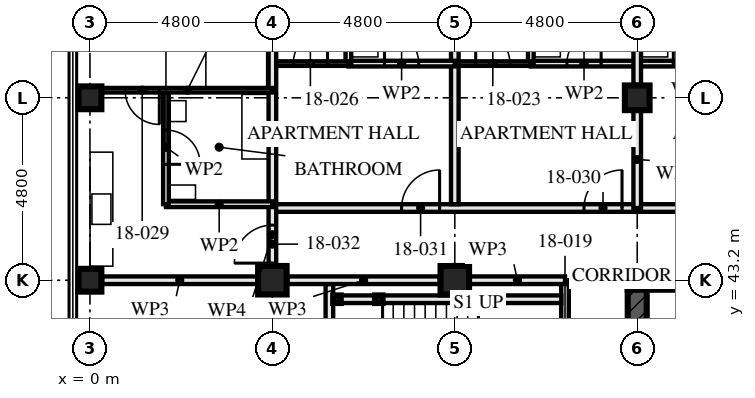
"""IFC4 building model, lengths in metres.
Left out: names, types, materials, properties, quantities, classifications, styles, units other than length and angle.
Written with IfcOpenShell. Run it as: python <this file> out.ifc"""

import sys

from ifc_helpers import new_model, si_unit, direction, frame, frame_2d, origin, origin_2d, place, context, subcontext, project, spatial, rectangle, hollow_rectangle, extrude, element, fill, save


model = new_model("IFC4")
c1 = context("Model", 3, precision=1e-05, world=origin(), true_north=direction((0.0, 1.0)))
c2 = subcontext(c1, "Body", "Model", "MODEL_VIEW")
j1 = project(units=[si_unit("LENGTHUNIT", "METRE"), si_unit("PLANEANGLEUNIT", "RADIAN")], contexts=[c1])
p1 = place(None, origin())
s1 = spatial("IfcSite", under=j1, at=p1, CompositionType="ELEMENT")
p2 = place(p1, origin())
s2 = spatial("IfcBuilding", under=s1, at=p2, CompositionType="ELEMENT")
p3 = place(p2, frame((0.0, 0.0, 69.0)))
s3 = spatial("IfcBuildingStorey", under=s2, at=p3, CompositionType="ELEMENT", Elevation=69.0)
for number, where, z_axis, x_axis in (
    (1, (0.0, 43.2, 0.0), (0.0, 0.0, 1.0), (0.0, 1.0, 0.0)),
    (2, (0.0, 48.0, 0.0), (0.0, 0.0, 1.0), (1.0, 0.0, 0.0)),
):
    element("IfcColumn", number, at=place(p3, frame(where, z_axis=z_axis, x_axis=x_axis)), inside=s3, PredefinedType="COLUMN", context=c2, shape_type="SweptSolid", body=[
        extrude(hollow_rectangle(XDim=0.6, YDim=0.6, WallThickness=0.08, at=origin_2d()), origin(), (0.0, 0.0, 1.0), 3.5),
    ])
for number, where, z_axis, x_axis in (
    (3, (4.8, 43.2, 0.0), (0.0, 0.0, 1.0), (0.0, 1.0, 0.0)),
    (4, (9.6, 43.2, 0.0), (0.0, 0.0, 1.0), (0.0, 1.0, 0.0)),
):
    element("IfcColumn", number, at=place(p3, frame(where, z_axis=z_axis, x_axis=x_axis)), inside=s3, PredefinedType="COLUMN", context=c2, shape_type="SweptSolid", body=[
        extrude(hollow_rectangle(XDim=0.75, YDim=0.75, WallThickness=0.08, at=origin_2d()), origin(), (0.0, 0.0, 1.0), 3.5),
    ])
p4 = place(p3, frame((14.4, 48.0, 0.0), z_axis=(0.0, 0.0, 1.0), x_axis=(1.0, 0.0, 0.0)))
e5 = element("IfcColumn", 5, at=p4, inside=s3, PredefinedType="COLUMN", context=c2, shape_type="SweptSolid", body=[
    extrude(hollow_rectangle(XDim=0.65, YDim=0.65, WallThickness=0.05, at=origin_2d()), origin(), (0.0, 0.0, 1.0), 3.5),
])
p5 = place(p3, frame((29.05, 43.2, -0.17), z_axis=(0.0, 0.0, 1.0), x_axis=(-1.0, 0.0, 0.0)))
e6 = element("IfcWall", 6, at=p5, inside=s3, PredefinedType="SHEAR", context=c2, shape_type="SweptSolid", body=[
    extrude(rectangle(XDim=14.9, YDim=0.5, at=frame_2d((7.45, 0.0))), origin(), (0.0, 0.0, 1.0), 3.5),
])
p6 = place(p5, frame((6.85, 0.0, 0.17)))
e7 = element("IfcOpeningElement", 7, at=p6, cuts=e6, PredefinedType="OPENING", context=c2, shape_type="SweptSolid", body=[
    extrude(rectangle(XDim=1.2, YDim=2.1, at=frame_2d((0.6, 1.05))), frame((0.0, 0.26, 0.0), z_axis=(0.0, -1.0, 0.0), x_axis=(1.0, 0.0, 0.0)), (0.0, 0.0, 1.0), 0.521),
])
p7 = place(p3, frame((14.4, 42.95, -0.17), z_axis=(0.0, 0.0, 1.0), x_axis=(0.0, -1.0, 0.0)))
e8 = element("IfcWall", 8, at=p7, inside=s3, PredefinedType="SHEAR", context=c2, shape_type="SweptSolid", body=[
    extrude(rectangle(XDim=13.9, YDim=0.5, at=frame_2d((6.95, 0.0))), origin(), (0.0, 0.0, 1.0), 3.5),
])
p8 = place(p7, frame((6.35, 0.0, 0.17)))
e9 = element("IfcOpeningElement", 9, at=p8, cuts=e8, PredefinedType="OPENING", context=c2, shape_type="SweptSolid", body=[
    extrude(rectangle(XDim=1.2, YDim=2.1, at=frame_2d((0.6, 1.05))), frame((0.0, 0.26, 0.0), z_axis=(0.0, -1.0, 0.0), x_axis=(1.0, 0.0, 0.0)), (0.0, 0.0, 1.0), 0.521),
])
for number, where, z_axis, x_axis in (
    (10, (6.5, 42.7, 0.0), (0.0, 0.0, 1.0), (1.0, 0.0, 0.0)),
    (11, (7.6, 42.7, 0.0), (0.0, 0.0, 1.0), (1.0, 0.0, 0.0)),
):
    element("IfcColumn", number, at=place(p3, frame(where, z_axis=z_axis, x_axis=x_axis)), inside=s3, PredefinedType="COLUMN", context=c2, shape_type="SweptSolid", body=[
        extrude(hollow_rectangle(XDim=0.2, YDim=0.2, WallThickness=0.008, at=origin_2d()), origin(), (0.0, 0.0, 1.0), 3.33),
    ])
p9 = place(p3, frame((6.6, 42.7, 0.0), z_axis=(0.0, 0.0, 1.0), x_axis=(1.0, 0.0, 0.0)))
e12 = element("IfcWall", 12, at=p9, inside=s3, PredefinedType="SOLIDWALL", context=c2, shape_type="SweptSolid", body=[
    extrude(rectangle(XDim=0.9, YDim=0.2, at=frame_2d((0.45, 0.0))), origin(), (0.0, 0.0, 1.0), 2.99),
])
p10 = place(p3, frame((7.7, 42.7, 0.0), z_axis=(0.0, 0.0, 1.0), x_axis=(1.0, 0.0, 0.0)))
e13 = element("IfcWall", 13, at=p10, inside=s3, PredefinedType="SOLIDWALL", context=c2, shape_type="SweptSolid", body=[
    extrude(rectangle(XDim=4.7, YDim=0.2, at=frame_2d((2.35, 0.0))), origin(), (0.0, 0.0, 1.0), 2.99),
])
p11 = place(p3, frame((6.3, 43.1, 0.0), z_axis=(0.0, 0.0, 1.0), x_axis=(0.0, -1.0, 0.0)))
e14 = element("IfcWall", 14, at=p11, inside=s3, PredefinedType="SOLIDWALL", context=c2, shape_type="SweptSolid", body=[
    extrude(rectangle(XDim=3.3, YDim=0.2, at=frame_2d((1.65, 0.0))), origin(), (0.0, 0.0, 1.0), 3.33),
])
p12 = place(p3, frame((12.5, 43.2, 0.0), z_axis=(0.0, 0.0, 1.0), x_axis=(0.0, -1.0, 0.0)))
e15 = element("IfcWall", 15, at=p12, inside=s3, PredefinedType="PARTITIONING", context=c2, shape_type="SweptSolid", body=[
    extrude(rectangle(XDim=14.4, YDim=0.2, at=frame_2d((7.2, 0.0))), origin(), (0.0, 0.0, 1.0), 2.55),
])
p13 = place(p12, frame((1.4, 0.0, 0.0)))
e16 = element("IfcOpeningElement", 16, at=p13, cuts=e15, PredefinedType="OPENING", context=c2, shape_type="SweptSolid", body=[
    extrude(rectangle(XDim=1.0, YDim=2.1, at=frame_2d((0.5, 1.05))), frame((0.0, 0.111, 0.0), z_axis=(0.0, -1.0, 0.0), x_axis=(1.0, 0.0, 0.0)), (0.0, 0.0, 1.0), 0.221),
])
p14 = place(p12, frame((5.2, 0.0, 0.0)))
e17 = element("IfcOpeningElement", 17, at=p14, cuts=e15, PredefinedType="OPENING", context=c2, shape_type="SweptSolid", body=[
    extrude(rectangle(XDim=1.0, YDim=2.1, at=frame_2d((0.5, 1.05))), frame((0.0, 0.111, 0.0), z_axis=(0.0, -1.0, 0.0), x_axis=(1.0, 0.0, 0.0)), (0.0, 0.0, 1.0), 0.221),
])
p15 = place(p12, frame((10.0, 0.0, 0.0)))
e18 = element("IfcOpeningElement", 18, at=p15, cuts=e15, PredefinedType="OPENING", context=c2, shape_type="SweptSolid", body=[
    extrude(rectangle(XDim=1.0, YDim=2.1, at=frame_2d((0.5, 1.05))), frame((0.0, 0.111, 0.0), z_axis=(0.0, -1.0, 0.0), x_axis=(1.0, 0.0, 0.0)), (0.0, 0.0, 1.0), 0.221),
])
p16 = place(p3, frame((11.6, 51.9, 0.0), z_axis=(0.0, 0.0, 1.0), x_axis=(0.0, -1.0, 0.0)))
e19 = element("IfcWall", 19, at=p16, inside=s3, PredefinedType="PARTITIONING", context=c2, shape_type="SweptSolid", body=[
    extrude(rectangle(XDim=3.0, YDim=0.15, at=frame_2d((1.5, 0.0))), origin(), (0.0, 0.0, 1.0), 3.33),
])
p17 = place(p3, frame((14.4, 48.9, 0.0), z_axis=(0.0, 0.0, 1.0), x_axis=(-1.0, 0.0, 0.0)))
e20 = element("IfcWall", 20, at=p17, inside=s3, PredefinedType="PARTITIONING", context=c2, shape_type="SweptSolid", body=[
    extrude(rectangle(XDim=2.8, YDim=0.15, at=frame_2d((1.4, 0.0))), origin(), (0.0, 0.0, 1.0), 3.33),
])
p18 = place(p17, frame((0.95, 0.0, 0.0)))
e21 = element("IfcOpeningElement", 21, at=p18, cuts=e20, PredefinedType="OPENING", context=c2, shape_type="SweptSolid", body=[
    extrude(rectangle(XDim=0.9, YDim=2.1, at=frame_2d((0.45, 1.05))), frame((0.0, 0.085, 0.0), z_axis=(0.0, -1.0, 0.0), x_axis=(1.0, 0.0, 0.0)), (0.0, 0.0, 1.0), 0.171),
])
p19 = place(p3, frame((11.6, 48.9, 0.0), z_axis=(0.0, 0.0, 1.0), x_axis=(-1.0, 0.0, 0.0)))
e22 = element("IfcWall", 22, at=p19, inside=s3, PredefinedType="PARTITIONING", context=c2, shape_type="SweptSolid", body=[
    extrude(rectangle(XDim=2.0, YDim=0.12, at=frame_2d((1.0, 0.0))), origin(), (0.0, 0.0, 1.0), 3.33),
])
p20 = place(p19, frame((0.55, 0.0, 0.0)))
e23 = element("IfcOpeningElement", 23, at=p20, cuts=e22, PredefinedType="OPENING", context=c2, shape_type="SweptSolid", body=[
    extrude(rectangle(XDim=0.9, YDim=2.1, at=frame_2d((0.45, 1.05))), frame((0.0, 0.071, 0.0), z_axis=(0.0, -1.0, 0.0), x_axis=(1.0, 0.0, 0.0)), (0.0, 0.0, 1.0), 0.141),
])
p21 = place(p3, frame((9.6, 57.28, 0.0), z_axis=(0.0, 0.0, 1.0), x_axis=(0.0, -1.0, 0.0)))
e24 = element("IfcWall", 24, at=p21, inside=s3, PredefinedType="PARTITIONING", context=c2, shape_type="SweptSolid", body=[
    extrude(rectangle(XDim=12.08, YDim=0.2, at=frame_2d((6.04, 0.0))), origin(), (0.0, 0.0, 1.0), 2.55),
])
p22 = place(p3, frame((6.8, 51.9, 0.0), z_axis=(0.0, 0.0, 1.0), x_axis=(0.0, -1.0, 0.0)))
e25 = element("IfcWall", 25, at=p22, inside=s3, PredefinedType="PARTITIONING", context=c2, shape_type="SweptSolid", body=[
    extrude(rectangle(XDim=3.0, YDim=0.15, at=frame_2d((1.5, 0.0))), origin(), (0.0, 0.0, 1.0), 3.33),
])
p23 = place(p3, frame((9.6, 48.9, 0.0), z_axis=(0.0, 0.0, 1.0), x_axis=(-1.0, 0.0, 0.0)))
e26 = element("IfcWall", 26, at=p23, inside=s3, PredefinedType="PARTITIONING", context=c2, shape_type="SweptSolid", body=[
    extrude(rectangle(XDim=2.8, YDim=0.15, at=frame_2d((1.4, 0.0))), origin(), (0.0, 0.0, 1.0), 3.33),
])
p24 = place(p23, frame((0.95, 0.0, 0.0)))
e27 = element("IfcOpeningElement", 27, at=p24, cuts=e26, PredefinedType="OPENING", context=c2, shape_type="SweptSolid", body=[
    extrude(rectangle(XDim=0.9, YDim=2.1, at=frame_2d((0.45, 1.05))), frame((0.0, 0.085, 0.0), z_axis=(0.0, -1.0, 0.0), x_axis=(1.0, 0.0, 0.0)), (0.0, 0.0, 1.0), 0.171),
])
p25 = place(p3, frame((6.8, 48.9, 0.0), z_axis=(0.0, 0.0, 1.0), x_axis=(-1.0, 0.0, 0.0)))
e28 = element("IfcWall", 28, at=p25, inside=s3, PredefinedType="PARTITIONING", context=c2, shape_type="SweptSolid", body=[
    extrude(rectangle(XDim=2.0, YDim=0.12, at=frame_2d((1.0, 0.0))), origin(), (0.0, 0.0, 1.0), 3.33),
])
p26 = place(p25, frame((0.55, 0.0, 0.0)))
e29 = element("IfcOpeningElement", 29, at=p26, cuts=e28, PredefinedType="OPENING", context=c2, shape_type="SweptSolid", body=[
    extrude(rectangle(XDim=0.9, YDim=2.1, at=frame_2d((0.45, 1.05))), frame((0.0, 0.071, 0.0), z_axis=(0.0, -1.0, 0.0), x_axis=(1.0, 0.0, 0.0)), (0.0, 0.0, 1.0), 0.141),
])
p27 = place(p3, frame((4.8, 52.48, 0.0), z_axis=(0.0, 0.0, 1.0), x_axis=(0.0, -1.0, 0.0)))
e30 = element("IfcWall", 30, at=p27, inside=s3, PredefinedType="PARTITIONING", context=c2, shape_type="SweptSolid", body=[
    extrude(rectangle(XDim=7.28, YDim=0.2, at=frame_2d((3.64, 0.0))), origin(), (0.0, 0.0, 1.0), 2.55),
])
p28 = place(p3, frame((2.0, 48.2, 0.0), z_axis=(0.0, 0.0, 1.0), x_axis=(0.0, -1.0, 0.0)))
e31 = element("IfcWall", 31, at=p28, inside=s3, PredefinedType="PARTITIONING", context=c2, shape_type="SweptSolid", body=[
    extrude(rectangle(XDim=3.0, YDim=0.15, at=frame_2d((1.5, 0.0))), origin(), (0.0, 0.0, 1.0), 2.55),
])
p29 = place(p28, frame((1.05, 0.0, 0.0)))
e32 = element("IfcOpeningElement", 32, at=p29, cuts=e31, PredefinedType="OPENING", context=c2, shape_type="SweptSolid", body=[
    extrude(rectangle(XDim=0.9, YDim=2.1, at=frame_2d((0.45, 1.05))), frame((0.0, 0.085, 0.0), z_axis=(0.0, -1.0, 0.0), x_axis=(1.0, 0.0, 0.0)), (0.0, 0.0, 1.0), 0.171),
])
p30 = place(p3, frame((4.8, 45.2, 0.0), z_axis=(0.0, 0.0, 1.0), x_axis=(-1.0, 0.0, 0.0)))
e33 = element("IfcWall", 33, at=p30, inside=s3, PredefinedType="PARTITIONING", context=c2, shape_type="SweptSolid", body=[
    extrude(rectangle(XDim=2.8, YDim=0.15, at=frame_2d((1.4, 0.0))), origin(), (0.0, 0.0, 1.0), 3.33),
])
p31 = place(p3, frame((4.8, 48.2, 0.0), z_axis=(0.0, 0.0, 1.0), x_axis=(-1.0, 0.0, 0.0)))
e34 = element("IfcWall", 34, at=p31, inside=s3, PredefinedType="PARTITIONING", context=c2, shape_type="SweptSolid", body=[
    extrude(rectangle(XDim=4.48, YDim=0.12, at=frame_2d((2.24, 0.0))), origin(), (0.0, 0.0, 1.0), 3.33),
])
p32 = place(p31, frame((2.975, 0.0, 0.0)))
e35 = element("IfcOpeningElement", 35, at=p32, cuts=e34, PredefinedType="OPENING", context=c2, shape_type="SweptSolid", body=[
    extrude(rectangle(XDim=0.9, YDim=2.1, at=frame_2d((0.45, 1.05))), frame((0.0, 0.071, 0.0), z_axis=(0.0, -1.0, 0.0), x_axis=(1.0, 0.0, 0.0)), (0.0, 0.0, 1.0), 0.141),
])
p33 = place(p3, frame((14.4, 45.1, 0.0), z_axis=(0.0, 0.0, 1.0), x_axis=(-1.0, 0.0, 0.0)))
e36 = element("IfcWall", 36, at=p33, inside=s3, PredefinedType="PARTITIONING", context=c2, shape_type="SweptSolid", body=[
    extrude(rectangle(XDim=9.6, YDim=0.2, at=frame_2d((4.8, 0.0))), origin(), (0.0, 0.0, 1.0), 3.33),
])
p34 = place(p33, frame((0.4, 0.0, 0.0)))
e37 = element("IfcOpeningElement", 37, at=p34, cuts=e36, PredefinedType="OPENING", context=c2, shape_type="SweptSolid", body=[
    extrude(rectangle(XDim=1.0, YDim=2.1, at=frame_2d((0.5, 1.05))), frame((0.0, 0.111, 0.0), z_axis=(0.0, -1.0, 0.0), x_axis=(1.0, 0.0, 0.0)), (0.0, 0.0, 1.0), 0.221),
])
p35 = place(p33, frame((5.2, 0.0, 0.0)))
e38 = element("IfcOpeningElement", 38, at=p35, cuts=e36, PredefinedType="OPENING", context=c2, shape_type="SweptSolid", body=[
    extrude(rectangle(XDim=1.0, YDim=2.1, at=frame_2d((0.5, 1.05))), frame((0.0, 0.111, 0.0), z_axis=(0.0, -1.0, 0.0), x_axis=(1.0, 0.0, 0.0)), (0.0, 0.0, 1.0), 0.221),
])
p36 = place(p3, frame((4.8, 45.2, 0.0), z_axis=(0.0, 0.0, 1.0), x_axis=(0.0, -1.0, 0.0)))
e39 = element("IfcWall", 39, at=p36, inside=s3, PredefinedType="PARTITIONING", context=c2, shape_type="SweptSolid", body=[
    extrude(rectangle(XDim=1.605, YDim=0.2, at=frame_2d((0.802, 0.0))), origin(), (0.0, 0.0, 1.0), 3.33),
])
p37 = place(p36, frame((0.55, 0.0, 0.0)))
e40 = element("IfcOpeningElement", 40, at=p37, cuts=e39, PredefinedType="OPENING", context=c2, shape_type="SweptSolid", body=[
    extrude(rectangle(XDim=1.0, YDim=2.1, at=frame_2d((0.5, 1.05))), frame((0.0, 0.111, 0.0), z_axis=(0.0, -1.0, 0.0), x_axis=(1.0, 0.0, 0.0)), (0.0, 0.0, 1.0), 0.221),
])
p38 = place(p3, frame((17.2, 48.9, 0.0), z_axis=(0.0, 0.0, 1.0), x_axis=(-1.0, 0.0, 0.0)))
e41 = element("IfcWall", 41, at=p38, inside=s3, PredefinedType="PARTITIONING", context=c2, shape_type="SweptSolid", body=[
    extrude(rectangle(XDim=2.8, YDim=0.15, at=frame_2d((1.4, 0.0))), origin(), (0.0, 0.0, 1.0), 3.33),
])
p39 = place(p38, frame((0.95, 0.0, 0.0)))
e42 = element("IfcOpeningElement", 42, at=p39, cuts=e41, PredefinedType="OPENING", context=c2, shape_type="SweptSolid", body=[
    extrude(rectangle(XDim=0.9, YDim=2.1, at=frame_2d((0.45, 1.05))), frame((0.0, 0.085, 0.0), z_axis=(0.0, -1.0, 0.0), x_axis=(1.0, 0.0, 0.0)), (0.0, 0.0, 1.0), 0.171),
])
p40 = place(p3, frame((28.8, 45.1, 0.0), z_axis=(0.0, 0.0, 1.0), x_axis=(-1.0, 0.0, 0.0)))
e43 = element("IfcWall", 43, at=p40, inside=s3, PredefinedType="PARTITIONING", context=c2, shape_type="SweptSolid", body=[
    extrude(rectangle(XDim=14.4, YDim=0.2, at=frame_2d((7.2, 0.0))), origin(), (0.0, 0.0, 1.0), 3.33),
])
p41 = place(p40, frame((0.4, 0.0, 0.0)))
e44 = element("IfcOpeningElement", 44, at=p41, cuts=e43, PredefinedType="OPENING", context=c2, shape_type="SweptSolid", body=[
    extrude(rectangle(XDim=1.0, YDim=2.1, at=frame_2d((0.5, 1.05))), frame((0.0, 0.111, 0.0), z_axis=(0.0, -1.0, 0.0), x_axis=(1.0, 0.0, 0.0)), (0.0, 0.0, 1.0), 0.221),
])
p42 = place(p40, frame((5.2, 0.0, 0.0)))
e45 = element("IfcOpeningElement", 45, at=p42, cuts=e43, PredefinedType="OPENING", context=c2, shape_type="SweptSolid", body=[
    extrude(rectangle(XDim=1.0, YDim=2.1, at=frame_2d((0.5, 1.05))), frame((0.0, 0.111, 0.0), z_axis=(0.0, -1.0, 0.0), x_axis=(1.0, 0.0, 0.0)), (0.0, 0.0, 1.0), 0.221),
])
p43 = place(p40, frame((10.0, 0.0, 0.0)))
e46 = element("IfcOpeningElement", 46, at=p43, cuts=e43, PredefinedType="OPENING", context=c2, shape_type="SweptSolid", body=[
    extrude(rectangle(XDim=1.0, YDim=2.1, at=frame_2d((0.5, 1.05))), frame((0.0, 0.111, 0.0), z_axis=(0.0, -1.0, 0.0), x_axis=(1.0, 0.0, 0.0)), (0.0, 0.0, 1.0), 0.221),
])
p44 = place(p3, frame((12.5, 43.2, 0.0), z_axis=(0.0, 0.0, 1.0), x_axis=(-1.0, 0.0, 0.0)))
e47 = element("IfcWall", 47, at=p44, inside=s3, PredefinedType="PARTITIONING", context=c2, shape_type="SweptSolid", body=[
    extrude(rectangle(XDim=2.505, YDim=0.2, at=frame_2d((1.252, 0.0))), origin(), (0.0, 0.0, 1.0), 2.32),
])
p45 = place(p3, frame((9.205, 43.2, 0.0), z_axis=(0.0, 0.0, 1.0), x_axis=(-1.0, 0.0, 0.0)))
e48 = element("IfcWall", 48, at=p45, inside=s3, PredefinedType="PARTITIONING", context=c2, shape_type="SweptSolid", body=[
    extrude(rectangle(XDim=4.01, YDim=0.2, at=frame_2d((2.005, 0.0))), origin(), (0.0, 0.0, 1.0), 2.32),
])
p46 = place(p3, frame((4.405, 43.2, 0.0), z_axis=(0.0, 0.0, 1.0), x_axis=(-1.0, 0.0, 0.0)))
e49 = element("IfcWall", 49, at=p46, inside=s3, PredefinedType="PARTITIONING", context=c2, shape_type="SweptSolid", body=[
    extrude(rectangle(XDim=4.085, YDim=0.2, at=frame_2d((2.042, 0.0))), origin(), (0.0, 0.0, 1.0), 2.32),
])
p47 = place(p3, frame((14.4, 45.1, 0.0), z_axis=(0.0, 0.0, 1.0), x_axis=(0.0, 1.0, 0.0)))
e50 = element("IfcWall", 50, at=p47, inside=s3, PredefinedType="PARTITIONING", context=c2, shape_type="SweptSolid", body=[
    extrude(rectangle(XDim=2.555, YDim=0.2, at=frame_2d((1.277, 0.0))), origin(), (0.0, 0.0, 1.0), 2.32),
])
p48 = place(p3, frame((14.4, 48.345, 0.0), z_axis=(0.0, 0.0, 1.0), x_axis=(0.0, 1.0, 0.0)))
e51 = element("IfcWall", 51, at=p48, inside=s3, PredefinedType="PARTITIONING", context=c2, shape_type="SweptSolid", body=[
    extrude(rectangle(XDim=4.11, YDim=0.2, at=frame_2d((2.055, 0.0))), origin(), (0.0, 0.0, 1.0), 2.32),
])
p49 = place(p18, frame((0.9, 0.0, 0.0), z_axis=(0.0, 0.0, 1.0), x_axis=(-1.0, 0.0, 0.0)))
e52 = element("IfcDoor", 52, at=p49, inside=s3, OperationType="SINGLE_SWING_LEFT", PredefinedType="DOOR", context=c2, shape_type="SweptSolid", body=[
    extrude(rectangle(XDim=0.9, YDim=2.1, at=frame_2d((0.45, 1.05))), frame((0.0, 0.022, 0.0), z_axis=(0.0, -1.0, 0.0), x_axis=(1.0, 0.0, 0.0)), (0.0, 0.0, 1.0), 0.044),
])
fill(e21, e52)
p50 = place(p20, frame((0.9, 0.0, 0.0), z_axis=(0.0, 0.0, 1.0), x_axis=(-1.0, 0.0, 0.0)))
e53 = element("IfcDoor", 53, at=p50, inside=s3, OperationType="SINGLE_SWING_RIGHT", PredefinedType="DOOR", context=c2, shape_type="SweptSolid", body=[
    extrude(rectangle(XDim=0.9, YDim=2.1, at=frame_2d((0.45, 1.05))), frame((0.0, 0.022, 0.0), z_axis=(0.0, -1.0, 0.0), x_axis=(1.0, 0.0, 0.0)), (0.0, 0.0, 1.0), 0.044),
])
fill(e23, e53)
p51 = place(p24, frame((0.9, 0.0, 0.0), z_axis=(0.0, 0.0, 1.0), x_axis=(-1.0, 0.0, 0.0)))
e54 = element("IfcDoor", 54, at=p51, inside=s3, OperationType="SINGLE_SWING_RIGHT", PredefinedType="DOOR", context=c2, shape_type="SweptSolid", body=[
    extrude(rectangle(XDim=0.9, YDim=2.1, at=frame_2d((0.45, 1.05))), frame((0.0, 0.022, 0.0), z_axis=(0.0, -1.0, 0.0), x_axis=(1.0, 0.0, 0.0)), (0.0, 0.0, 1.0), 0.044),
])
fill(e27, e54)
p52 = place(p26, frame((0.9, 0.0, 0.0), z_axis=(0.0, 0.0, 1.0), x_axis=(-1.0, 0.0, 0.0)))
e55 = element("IfcDoor", 55, at=p52, inside=s3, OperationType="SINGLE_SWING_LEFT", PredefinedType="DOOR", context=c2, shape_type="SweptSolid", body=[
    extrude(rectangle(XDim=0.9, YDim=2.1, at=frame_2d((0.45, 1.05))), frame((0.0, 0.022, 0.0), z_axis=(0.0, -1.0, 0.0), x_axis=(1.0, 0.0, 0.0)), (0.0, 0.0, 1.0), 0.044),
])
fill(e29, e55)
p53 = place(p29, origin())
e56 = element("IfcDoor", 56, at=p53, inside=s3, OperationType="SINGLE_SWING_LEFT", PredefinedType="DOOR", context=c2, shape_type="SweptSolid", body=[
    extrude(rectangle(XDim=0.9, YDim=2.1, at=frame_2d((0.45, 1.05))), frame((0.0, 0.022, 0.0), z_axis=(0.0, -1.0, 0.0), x_axis=(1.0, 0.0, 0.0)), (0.0, 0.0, 1.0), 0.044),
])
fill(e32, e56)
p54 = place(p32, origin())
e57 = element("IfcDoor", 57, at=p54, inside=s3, OperationType="SINGLE_SWING_RIGHT", PredefinedType="DOOR", context=c2, shape_type="SweptSolid", body=[
    extrude(rectangle(XDim=0.9, YDim=2.1, at=frame_2d((0.45, 1.05))), frame((0.0, 0.022, 0.0), z_axis=(0.0, -1.0, 0.0), x_axis=(1.0, 0.0, 0.0)), (0.0, 0.0, 1.0), 0.044),
])
fill(e35, e57)
p55 = place(p34, frame((1.0, 0.0, 0.0), z_axis=(0.0, 0.0, 1.0), x_axis=(-1.0, 0.0, 0.0)))
e58 = element("IfcDoor", 58, at=p55, inside=s3, OperationType="SINGLE_SWING_LEFT", PredefinedType="DOOR", context=c2, shape_type="SweptSolid", body=[
    extrude(rectangle(XDim=1.0, YDim=2.1, at=frame_2d((0.5, 1.05))), frame((0.0, 0.027, 0.0), z_axis=(0.0, -1.0, 0.0), x_axis=(1.0, 0.0, 0.0)), (0.0, 0.0, 1.0), 0.054),
])
fill(e37, e58)
p56 = place(p35, frame((1.0, 0.0, 0.0), z_axis=(0.0, 0.0, 1.0), x_axis=(-1.0, 0.0, 0.0)))
e59 = element("IfcDoor", 59, at=p56, inside=s3, OperationType="SINGLE_SWING_LEFT", PredefinedType="DOOR", context=c2, shape_type="SweptSolid", body=[
    extrude(rectangle(XDim=1.0, YDim=2.1, at=frame_2d((0.5, 1.05))), frame((0.0, 0.027, 0.0), z_axis=(0.0, -1.0, 0.0), x_axis=(1.0, 0.0, 0.0)), (0.0, 0.0, 1.0), 0.054),
])
fill(e38, e59)
p57 = place(p37, frame((1.0, 0.0, 0.0), z_axis=(0.0, 0.0, 1.0), x_axis=(-1.0, 0.0, 0.0)))
e60 = element("IfcDoor", 60, at=p57, inside=s3, OperationType="SINGLE_SWING_RIGHT", PredefinedType="DOOR", context=c2, shape_type="SweptSolid", body=[
    extrude(rectangle(XDim=1.0, YDim=2.1, at=frame_2d((0.5, 1.05))), frame((0.0, 0.027, 0.0), z_axis=(0.0, -1.0, 0.0), x_axis=(1.0, 0.0, 0.0)), (0.0, 0.0, 1.0), 0.054),
])
fill(e40, e60)
p58 = place(p39, frame((0.9, 0.0, 0.0), z_axis=(0.0, 0.0, 1.0), x_axis=(-1.0, 0.0, 0.0)))
e61 = element("IfcDoor", 61, at=p58, inside=s3, OperationType="SINGLE_SWING_RIGHT", PredefinedType="DOOR", context=c2, shape_type="SweptSolid", body=[
    extrude(rectangle(XDim=0.9, YDim=2.1, at=frame_2d((0.45, 1.05))), frame((0.0, 0.022, 0.0), z_axis=(0.0, -1.0, 0.0), x_axis=(1.0, 0.0, 0.0)), (0.0, 0.0, 1.0), 0.044),
])
fill(e42, e61)
save(model, sys.argv[1])
